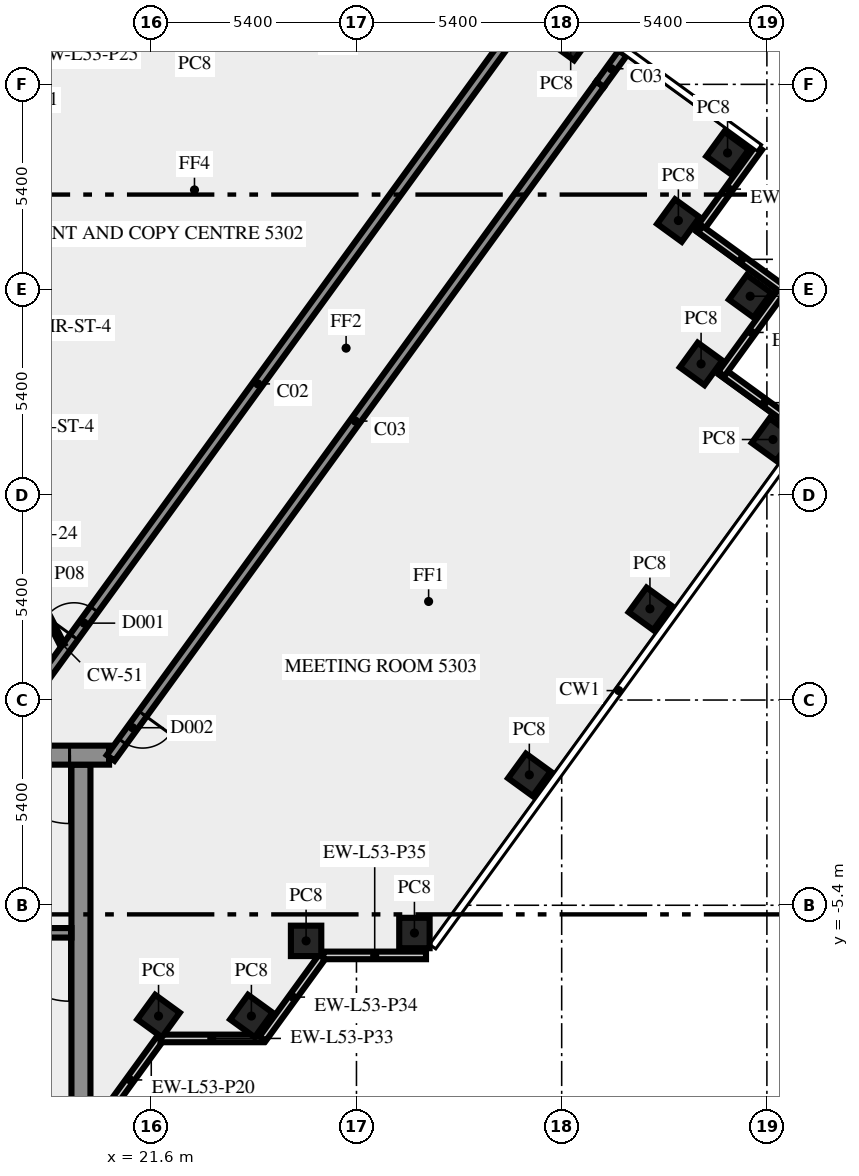
"""IFC4 building model, lengths in metres.
Left out: names, types, materials, properties, quantities, classifications, styles, units other than length and angle.
Written with IfcOpenShell. Run it as: python <this file> out.ifc"""

import sys

from ifc_helpers import new_model, si_unit, direction, frame, frame_2d, origin, origin_2d, place, context, subcontext, project, spatial, rectangle, extrude, element, fill, save


model = new_model("IFC4")
c1 = context("Model", 3, precision=1e-05, world=origin(), true_north=direction((0.0, 1.0)))
c2 = subcontext(c1, "Body", "Model", "MODEL_VIEW")
j1 = project(units=[si_unit("LENGTHUNIT", "METRE"), si_unit("PLANEANGLEUNIT", "RADIAN")], contexts=[c1])
p1 = place(None, origin())
s1 = spatial("IfcSite", under=j1, at=p1, CompositionType="ELEMENT")
p2 = place(p1, origin())
s2 = spatial("IfcBuilding", under=s1, at=p2, CompositionType="ELEMENT")
p3 = place(p2, frame((0.0, 0.0, 226.0)))
s3 = spatial("IfcBuildingStorey", under=s2, at=p3, CompositionType="ELEMENT", Elevation=226.0)
for number, where, z_axis, x_axis in (
    (1, (21.792, -8.315, 0.0), (0.0, 0.0, 1.0), (0.588, 0.809, 0.0)),
    (2, (24.235, -8.315, 0.0), (0.0, 0.0, 1.0), (0.588, 0.809, 0.0)),
    (3, (25.674, -6.337, 0.0), (0.0, 0.0, 1.0), (1.0, 0.0, 0.0)),
    (4, (28.525, -6.13, 0.0), (0.0, 0.0, 1.0), (1.0, 0.0, 0.0)),
    (5, (31.548, -1.969, 0.0), (0.0, 0.0, 1.0), (0.588, 0.809, 0.0)),
    (6, (34.722, 2.4, 0.0), (0.0, 0.0, 1.0), (0.588, 0.809, 0.0)),
    (7, (37.96, 6.855, 0.0), (0.0, 0.0, 1.0), (0.588, 0.809, 0.0)),
    (8, (36.068, 8.844, 0.0), (0.0, 0.0, 1.0), (0.588, 0.809, 0.0)),
    (9, (37.36, 10.625, 0.0), (0.0, 0.0, 1.0), (0.588, 0.809, 0.0)),
    (10, (35.471, 12.616, 0.0), (0.0, 0.0, 1.0), (-0.809, 0.588, 0.0)),
    (11, (36.765, 14.395, 0.0), (0.0, 0.0, 1.0), (-0.809, 0.588, 0.0)),
    (12, (32.637, 17.393, 0.0), (0.0, 0.0, 1.0), (-0.809, 0.588, 0.0)),
):
    element("IfcColumn", number, at=place(p3, frame(where, z_axis=z_axis, x_axis=x_axis)), inside=s3, PredefinedType="COLUMN", context=c2, shape_type="SweptSolid", body=[
        extrude(rectangle(XDim=0.8, YDim=0.8, at=origin_2d()), origin(), (0.0, 0.0, 1.0), 3.65),
    ])
p4 = place(p3, frame((20.253, -11.083, 0.0), z_axis=(0.0, 0.0, 1.0), x_axis=(0.587766567315, 0.809030569476, 0.0)))
e13 = element("IfcWall", 13, at=p4, inside=s3, PredefinedType="SOLIDWALL", context=c2, shape_type="SweptSolid", body=[
    extrude(rectangle(XDim=2.688, YDim=0.2, at=frame_2d((1.344, 0.0))), origin(), (0.0, 0.0, 1.0), 3.65),
])
for number, where, z_axis, x_axis in (
    (14, (36.005, 12.352, 0.0), (0.0, 0.0, 1.0), (0.588, 0.809, 0.0)),
    (15, (21.843, -8.904, 0.0), (0.0, 0.0, 1.0), (1.0, 0.0, 0.0)),
):
    element("IfcWall", number, at=place(p3, frame(where, z_axis=z_axis, x_axis=x_axis)), inside=s3, PredefinedType="SOLIDWALL", context=c2, shape_type="SweptSolid", body=[
        extrude(rectangle(XDim=2.7, YDim=0.2, at=frame_2d((1.35, 0.0))), origin(), (0.0, 0.0, 1.0), 3.65),
    ])
p5 = place(p3, frame((24.533, -8.909, 0.0), z_axis=(0.0, 0.0, 1.0), x_axis=(0.587720002413, 0.809064397168, 0.0)))
e16 = element("IfcWall", 16, at=p5, inside=s3, PredefinedType="SOLIDWALL", context=c2, shape_type="SweptSolid", body=[
    extrude(rectangle(XDim=2.7, YDim=0.2, at=frame_2d((1.35, 0.0))), origin(), (0.0, 0.0, 1.0), 3.65),
])
for number, where, z_axis, x_axis in (
    (17, (26.13, -6.719, 0.0), (0.0, 0.0, 1.0), (1.0, 0.0, 0.0)),
    (18, (38.829, 7.031, 0.0), (0.0, 0.0, 1.0), (-0.809, 0.588, 0.0)),
    (19, (36.602, 8.58, 0.0), (0.0, 0.0, 1.0), (0.588, 0.809, 0.0)),
    (20, (38.231, 10.802, 0.0), (0.0, 0.0, 1.0), (-0.809, 0.588, 0.0)),
):
    element("IfcWall", number, at=place(p3, frame(where, z_axis=z_axis, x_axis=x_axis)), inside=s3, PredefinedType="SOLIDWALL", context=c2, shape_type="SweptSolid", body=[
        extrude(rectangle(XDim=2.7, YDim=0.2, at=frame_2d((1.35, 0.0))), origin(), (0.0, 0.0, 1.0), 3.65),
    ])
p6 = place(p3, frame((19.75, -10.5, 0.0), z_axis=(0.0, 0.0, 1.0), x_axis=(0.0, 1.0, 0.0)))
e21 = element("IfcWall", 21, at=p6, inside=s3, PredefinedType="SHEAR", context=c2, shape_type="SweptSolid", body=[
    extrude(rectangle(XDim=8.8, YDim=0.5, at=frame_2d((4.4, 0.0))), origin(), (0.0, 0.0, 1.0), 3.65),
])
p7 = place(p3, frame((19.5, -6.125, 0.0), z_axis=(0.0, 0.0, 1.0), x_axis=(-1.0, 0.0, 0.0)))
e22 = element("IfcWall", 22, at=p7, inside=s3, PredefinedType="SHEAR", context=c2, shape_type="SweptSolid", body=[
    extrude(rectangle(XDim=8.05, YDim=0.25, at=frame_2d((4.025, 0.0))), origin(), (0.0, 0.0, 1.0), 3.65),
])
p8 = place(p7, frame((0.05, 0.0, 0.0)))
e23 = element("IfcOpeningElement", 23, at=p8, cuts=e22, PredefinedType="OPENING", context=c2, shape_type="SweptSolid", body=[
    extrude(rectangle(XDim=1.8, YDim=2.1, at=frame_2d((0.9, 1.05))), frame((0.0, 0.135, 0.0), z_axis=(0.0, -1.0, 0.0), x_axis=(1.0, 0.0, 0.0)), (0.0, 0.0, 1.0), 0.27),
])
p9 = place(p3, frame((20.49, -1.45, 0.0), z_axis=(0.0, 0.0, 1.0), x_axis=(-1.0, 0.0, 0.0)))
e24 = element("IfcWall", 24, at=p9, inside=s3, PredefinedType="SHEAR", context=c2, shape_type="SweptSolid", body=[
    extrude(rectangle(XDim=40.98, YDim=0.5, at=frame_2d((20.49, 0.0))), origin(), (0.0, 0.0, 1.0), 3.65),
])
p10 = place(p9, frame((38.14, 0.0, 0.0)))
e25 = element("IfcOpeningElement", 25, at=p10, cuts=e24, PredefinedType="OPENING", context=c2, shape_type="SweptSolid", body=[
    extrude(rectangle(XDim=1.8, YDim=2.1, at=frame_2d((0.9, 1.05))), frame((0.0, 0.26, 0.0), z_axis=(0.0, -1.0, 0.0), x_axis=(1.0, 0.0, 0.0)), (0.0, 0.0, 1.0), 0.52),
])
p11 = place(p9, frame((36.728, 0.0, 0.0)))
e26 = element("IfcOpeningElement", 26, at=p11, cuts=e24, PredefinedType="OPENING", context=c2, shape_type="SweptSolid", body=[
    extrude(rectangle(XDim=0.8, YDim=2.1, at=frame_2d((0.4, 1.05))), frame((0.0, 0.26, 0.0), z_axis=(0.0, -1.0, 0.0), x_axis=(1.0, 0.0, 0.0)), (0.0, 0.0, 1.0), 0.52),
])
p12 = place(p9, frame((35.153, 0.0, 0.0)))
e27 = element("IfcOpeningElement", 27, at=p12, cuts=e24, PredefinedType="OPENING", context=c2, shape_type="SweptSolid", body=[
    extrude(rectangle(XDim=0.8, YDim=2.1, at=frame_2d((0.4, 1.05))), frame((0.0, 0.26, 0.0), z_axis=(0.0, -1.0, 0.0), x_axis=(1.0, 0.0, 0.0)), (0.0, 0.0, 1.0), 0.52),
])
p13 = place(p9, frame((32.94, 0.0, 0.0)))
e28 = element("IfcOpeningElement", 28, at=p13, cuts=e24, PredefinedType="OPENING", context=c2, shape_type="SweptSolid", body=[
    extrude(rectangle(XDim=0.9, YDim=2.1, at=frame_2d((0.45, 1.05))), frame((0.0, 0.26, 0.0), z_axis=(0.0, -1.0, 0.0), x_axis=(1.0, 0.0, 0.0)), (0.0, 0.0, 1.0), 0.52),
])
p14 = place(p9, frame((30.202, 0.0, 0.0)))
e29 = element("IfcOpeningElement", 29, at=p14, cuts=e24, PredefinedType="OPENING", context=c2, shape_type="SweptSolid", body=[
    extrude(rectangle(XDim=0.9, YDim=2.1, at=frame_2d((0.45, 1.05))), frame((0.0, 0.26, 0.0), z_axis=(0.0, -1.0, 0.0), x_axis=(1.0, 0.0, 0.0)), (0.0, 0.0, 1.0), 0.52),
])
p15 = place(p9, frame((27.74, 0.0, 0.0)))
e30 = element("IfcOpeningElement", 30, at=p15, cuts=e24, PredefinedType="OPENING", context=c2, shape_type="SweptSolid", body=[
    extrude(rectangle(XDim=0.9, YDim=2.1, at=frame_2d((0.45, 1.05))), frame((0.0, 0.26, 0.0), z_axis=(0.0, -1.0, 0.0), x_axis=(1.0, 0.0, 0.0)), (0.0, 0.0, 1.0), 0.52),
])
p16 = place(p9, frame((25.377, 0.0, 0.0)))
e31 = element("IfcOpeningElement", 31, at=p16, cuts=e24, PredefinedType="OPENING", context=c2, shape_type="SweptSolid", body=[
    extrude(rectangle(XDim=0.9, YDim=2.1, at=frame_2d((0.45, 1.05))), frame((0.0, 0.26, 0.0), z_axis=(0.0, -1.0, 0.0), x_axis=(1.0, 0.0, 0.0)), (0.0, 0.0, 1.0), 0.52),
])
p17 = place(p9, frame((20.74, 0.0, 0.0)))
e32 = element("IfcOpeningElement", 32, at=p17, cuts=e24, PredefinedType="OPENING", context=c2, shape_type="SweptSolid", body=[
    extrude(rectangle(XDim=2.0, YDim=2.1, at=frame_2d((1.0, 1.05))), frame((0.0, 0.26, 0.0), z_axis=(0.0, -1.0, 0.0), x_axis=(1.0, 0.0, 0.0)), (0.0, 0.0, 1.0), 0.52),
])
p18 = place(p9, frame((7.14, 0.0, 0.0)))
e33 = element("IfcOpeningElement", 33, at=p18, cuts=e24, PredefinedType="OPENING", context=c2, shape_type="SweptSolid", body=[
    extrude(rectangle(XDim=0.9, YDim=2.1, at=frame_2d((0.45, 1.05))), frame((0.0, 0.26, 0.0), z_axis=(0.0, -1.0, 0.0), x_axis=(1.0, 0.0, 0.0)), (0.0, 0.0, 1.0), 0.52),
])
p19 = place(p9, frame((4.19, 0.0, 0.0)))
e34 = element("IfcOpeningElement", 34, at=p19, cuts=e24, PredefinedType="OPENING", context=c2, shape_type="SweptSolid", body=[
    extrude(rectangle(XDim=0.9, YDim=2.1, at=frame_2d((0.45, 1.05))), frame((0.0, 0.26, 0.0), z_axis=(0.0, -1.0, 0.0), x_axis=(1.0, 0.0, 0.0)), (0.0, 0.0, 1.0), 0.52),
])
p20 = place(p9, frame((1.04, 0.0, 0.0)))
e35 = element("IfcOpeningElement", 35, at=p20, cuts=e24, PredefinedType="OPENING", context=c2, shape_type="SweptSolid", body=[
    extrude(rectangle(XDim=1.8, YDim=2.1, at=frame_2d((0.9, 1.05))), frame((0.0, 0.26, 0.0), z_axis=(0.0, -1.0, 0.0), x_axis=(1.0, 0.0, 0.0)), (0.0, 0.0, 1.0), 0.52),
])
p21 = place(p3, frame((17.545, -1.125, 0.0), z_axis=(0.0, 0.0, 1.0), x_axis=(0.587787966774, 0.809015022181, 0.0)))
e36 = element("IfcWall", 36, at=p21, inside=s3, PredefinedType="SOLIDWALL", context=c2, shape_type="SweptSolid", body=[
    extrude(rectangle(XDim=23.345, YDim=0.25, at=frame_2d((11.672, 0.0))), origin(), (0.0, 0.0, 1.0), 3.65),
])
p22 = place(p21, frame((3.441, 0.0, 0.0)))
e37 = element("IfcOpeningElement", 37, at=p22, cuts=e36, PredefinedType="OPENING", context=c2, shape_type="SweptSolid", body=[
    extrude(rectangle(XDim=0.9, YDim=2.1, at=frame_2d((0.45, 1.05))), frame((0.0, 0.135, 0.0), z_axis=(0.0, -1.0, 0.0), x_axis=(1.0, 0.0, 0.0)), (0.0, 0.0, 1.0), 0.27),
])
p23 = place(p3, frame((33.41, 16.203, 0.0), z_axis=(0.0, 0.0, 1.0), x_axis=(-0.587786711753, -0.809015934013, 0.0)))
e38 = element("IfcWall", 38, at=p23, inside=s3, PredefinedType="SOLIDWALL", context=c2, shape_type="SweptSolid", body=[
    extrude(rectangle(XDim=21.911, YDim=0.25, at=frame_2d((10.956, 0.0))), origin(), (0.0, 0.0, 1.0), 3.65),
])
p24 = place(p23, frame((20.479, 0.0, 0.0)))
e39 = element("IfcOpeningElement", 39, at=p24, cuts=e38, PredefinedType="OPENING", context=c2, shape_type="SweptSolid", body=[
    extrude(rectangle(XDim=0.9, YDim=2.1, at=frame_2d((0.45, 1.05))), frame((0.0, 0.135, 0.0), z_axis=(0.0, -1.0, 0.0), x_axis=(1.0, 0.0, 0.0)), (0.0, 0.0, 1.0), 0.27),
])
p25 = place(p3, frame((18.0, 3.925, 0.0), z_axis=(0.0, 0.0, 1.0), x_axis=(0.453950796792, -0.891026752736, 0.0)))
e40 = element("IfcWall", 40, at=p25, inside=s3, PredefinedType="PARTITIONING", context=c2, shape_type="SweptSolid", body=[
    extrude(rectangle(XDim=2.778, YDim=0.12, at=frame_2d((1.389, 0.0))), origin(), (0.0, 0.0, 1.0), 3.65),
])
p26 = place(p3, frame((33.41, 16.203, 0.0), z_axis=(0.0, 0.0, 1.0), x_axis=(0.587696850957, 0.809081214326, 0.0)))
e41 = element("IfcWall", 41, at=p26, inside=s3, PredefinedType="SOLIDWALL", context=c2, shape_type="SweptSolid", body=[
    extrude(rectangle(XDim=1.009, YDim=0.25, at=frame_2d((0.504, 0.0))), origin(), (0.0, 0.0, 1.0), 2.85),
])
p27 = place(p8, origin())
e42 = element("IfcDoor", 42, at=p27, inside=s3, OperationType="DOUBLE_DOOR_SINGLE_SWING", PredefinedType="DOOR", context=c2, shape_type="SweptSolid", body=[
    extrude(rectangle(XDim=1.8, YDim=2.1, at=frame_2d((0.9, 1.05))), frame((0.0, 0.025, 0.0), z_axis=(0.0, -1.0, 0.0), x_axis=(1.0, 0.0, 0.0)), (0.0, 0.0, 1.0), 0.05),
])
fill(e23, e42)
p28 = place(p20, origin())
e43 = element("IfcDoor", 43, at=p28, inside=s3, OperationType="DOUBLE_DOOR_SINGLE_SWING", PredefinedType="DOOR", context=c2, shape_type="SweptSolid", body=[
    extrude(rectangle(XDim=1.8, YDim=2.1, at=frame_2d((0.9, 1.05))), frame((0.0, 0.025, 0.0), z_axis=(0.0, -1.0, 0.0), x_axis=(1.0, 0.0, 0.0)), (0.0, 0.0, 1.0), 0.05),
])
fill(e35, e43)
p29 = place(p24, origin())
e44 = element("IfcDoor", 44, at=p29, inside=s3, OperationType="SINGLE_SWING_RIGHT", PredefinedType="DOOR", context=c2, shape_type="SweptSolid", body=[
    extrude(rectangle(XDim=0.9, YDim=2.1, at=frame_2d((0.45, 1.05))), frame((0.0, 0.025, 0.0), z_axis=(0.0, -1.0, 0.0), x_axis=(1.0, 0.0, 0.0)), (0.0, 0.0, 1.0), 0.05),
])
fill(e39, e44)
p30 = place(p22, origin())
e45 = element("IfcDoor", 45, at=p30, inside=s3, OperationType="SINGLE_SWING_LEFT", PredefinedType="DOOR", context=c2, shape_type="SweptSolid", body=[
    extrude(rectangle(XDim=0.9, YDim=2.1, at=frame_2d((0.45, 1.05))), frame((0.0, 0.025, 0.0), z_axis=(0.0, -1.0, 0.0), x_axis=(1.0, 0.0, 0.0)), (0.0, 0.0, 1.0), 0.05),
])
fill(e37, e45)
save(model, sys.argv[1])
